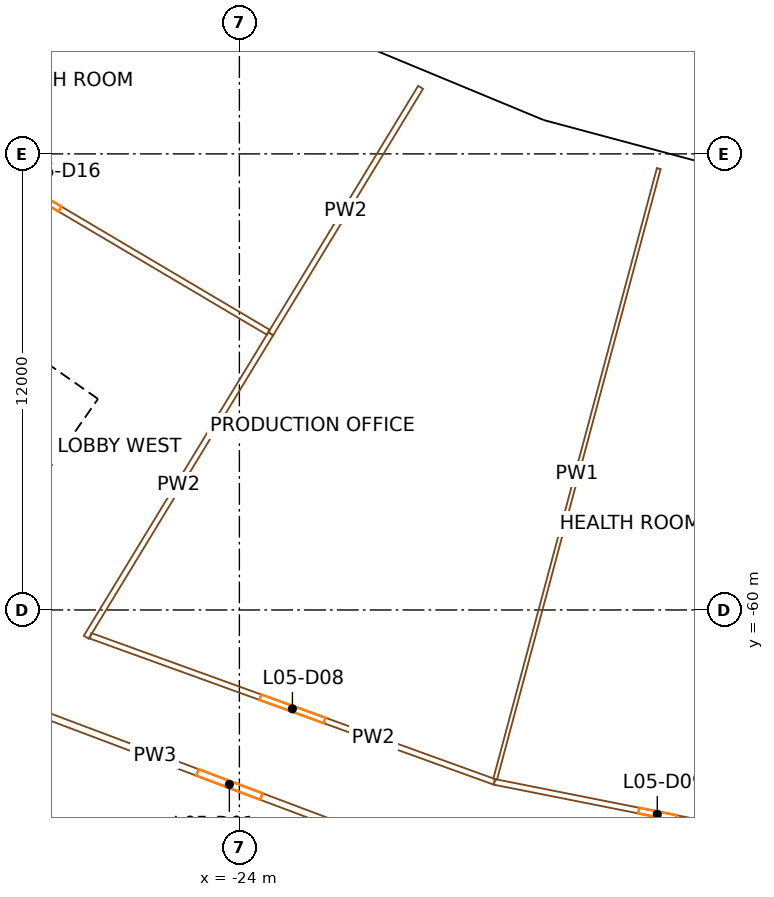
"""IFC4 building model, lengths in metres.
Left out: names, types, materials, properties, quantities, classifications, styles, units other than length and angle.
Written with IfcOpenShell. Run it as: python <this file> out.ifc"""

import sys

from ifc_helpers import new_model, si_unit, direction, frame, frame_2d, origin, origin_2d, place, context, subcontext, project, spatial, rectangle, extrude, element, fill, save


model = new_model("IFC4")
c1 = context("Model", 3, precision=1e-05, world=origin(), true_north=direction((0.0, 1.0)))
c2 = subcontext(c1, "Body", "Model", "MODEL_VIEW")
j1 = project(units=[si_unit("LENGTHUNIT", "METRE"), si_unit("PLANEANGLEUNIT", "RADIAN")], contexts=[c1])
p1 = place(None, origin())
s1 = spatial("IfcSite", under=j1, at=p1, CompositionType="ELEMENT")
p2 = place(p1, origin())
s2 = spatial("IfcBuilding", under=s1, at=p2, CompositionType="ELEMENT")
p3 = place(p2, frame((0.0, 0.0, 36.0)))
s3 = spatial("IfcBuildingStorey", under=s2, at=p3, CompositionType="ELEMENT", Elevation=36.0)
p4 = place(p3, frame((-22.446, -45.516, 0.0), z_axis=(0.0, 0.0, 1.0), x_axis=(0.896872741533, -0.442288690219, 0.0)))
e1 = element("IfcColumn", 1, at=p4, inside=s3, PredefinedType="COLUMN", context=c2, shape_type="SweptSolid", body=[
    extrude(rectangle(XDim=1.1, YDim=1.3, at=origin_2d()), origin(), (0.0, 0.0, 1.0), 4.5),
])
p5 = place(p3, frame((-25.763, -52.243, 0.0), z_axis=(0.0, 0.0, 1.0), x_axis=(0.896872741533, -0.442288690219, 0.0)))
e2 = element("IfcColumn", 2, at=p5, inside=s3, PredefinedType="COLUMN", context=c2, shape_type="SweptSolid", body=[
    extrude(rectangle(XDim=1.4, YDim=1.8, at=origin_2d()), origin(), (0.0, 0.0, 1.0), 4.5),
])
p6 = place(p3, frame((-16.313, -48.057, 0.0), z_axis=(0.0, 0.0, 1.0), x_axis=(0.946930129495, -0.321439465303, 0.0)))
e3 = element("IfcColumn", 3, at=p6, inside=s3, PredefinedType="COLUMN", context=c2, shape_type="SweptSolid", body=[
    extrude(rectangle(XDim=1.1, YDim=1.3, at=origin_2d()), origin(), (0.0, 0.0, 1.0), 4.5),
])
for number, where, z_axis, x_axis in (
    (4, (-18.724, -55.159, 0.0), (0.0, 0.0, 1.0), (0.947, -0.321, 0.0)),
    (5, (-11.364, -57.131, 0.0), (0.0, 0.0, 1.0), (0.981, -0.195, 0.0)),
):
    element("IfcColumn", number, at=place(p3, frame(where, z_axis=z_axis, x_axis=x_axis)), inside=s3, PredefinedType="COLUMN", context=c2, shape_type="SweptSolid", body=[
        extrude(rectangle(XDim=1.4, YDim=1.8, at=origin_2d()), origin(), (0.0, 0.0, 1.0), 4.5),
    ])
p7 = place(p3, frame((-36.717, -66.337, 0.0), z_axis=(0.0, 0.0, 1.0), x_axis=(0.573577477574, 0.819151315216, 0.0)))
e6 = element("IfcWall", 6, at=p7, inside=s3, PredefinedType="SHEAR", context=c2, shape_type="SweptSolid", body=[
    extrude(rectangle(XDim=14.8, YDim=0.9, at=frame_2d((7.4, 0.0))), origin(), (0.0, 0.0, 1.0), 4.2),
])
p8 = place(p7, frame((6.2, 0.0, 0.0)))
e7 = element("IfcOpeningElement", 7, at=p8, cuts=e6, PredefinedType="OPENING", context=c2, shape_type="SweptSolid", body=[
    extrude(rectangle(XDim=2.4, YDim=2.1, at=frame_2d((1.2, 1.05))), frame((0.0, 0.46, 0.0), z_axis=(0.0, -1.0, 0.0), x_axis=(1.0, 0.0, 0.0)), (0.0, 0.0, 1.0), 0.92),
])
p9 = place(p3, frame((-28.854, -54.324, 0.0), z_axis=(0.0, 0.0, 1.0), x_axis=(-0.819145767589, 0.573585400304, 0.0)))
e8 = element("IfcWall", 8, at=p9, inside=s3, PredefinedType="SHEAR", context=c2, shape_type="SweptSolid", body=[
    extrude(rectangle(XDim=15.045, YDim=0.9, at=frame_2d((7.523, 0.0))), origin(), (0.0, 0.0, 1.0), 4.2),
])
p10 = place(p9, frame((1.05, 0.0, 0.0)))
e9 = element("IfcOpeningElement", 9, at=p10, cuts=e8, PredefinedType="OPENING", context=c2, shape_type="SweptSolid", body=[
    extrude(rectangle(XDim=0.9, YDim=2.1, at=frame_2d((0.45, 1.05))), frame((0.0, 0.46, 0.0), z_axis=(0.0, -1.0, 0.0), x_axis=(1.0, 0.0, 0.0)), (0.0, 0.0, 1.0), 0.92),
])
p11 = place(p9, frame((3.775, 0.0, 0.0)))
e10 = element("IfcOpeningElement", 10, at=p11, cuts=e8, PredefinedType="OPENING", context=c2, shape_type="SweptSolid", body=[
    extrude(rectangle(XDim=1.0, YDim=2.1, at=frame_2d((0.5, 1.05))), frame((0.0, 0.46, 0.0), z_axis=(0.0, -1.0, 0.0), x_axis=(1.0, 0.0, 0.0)), (0.0, 0.0, 1.0), 0.92),
])
p12 = place(p9, frame((6.275, 0.0, 0.0)))
e11 = element("IfcOpeningElement", 11, at=p12, cuts=e8, PredefinedType="OPENING", context=c2, shape_type="SweptSolid", body=[
    extrude(rectangle(XDim=1.0, YDim=2.1, at=frame_2d((0.5, 1.05))), frame((0.0, 0.46, 0.0), z_axis=(0.0, -1.0, 0.0), x_axis=(1.0, 0.0, 0.0)), (0.0, 0.0, 1.0), 0.92),
])
p13 = place(p9, frame((13.495, 0.0, 0.0)))
e12 = element("IfcOpeningElement", 12, at=p13, cuts=e8, PredefinedType="OPENING", context=c2, shape_type="SweptSolid", body=[
    extrude(rectangle(XDim=1.1, YDim=2.1, at=frame_2d((0.55, 1.05))), frame((0.0, 0.46, 0.0), z_axis=(0.0, -1.0, 0.0), x_axis=(1.0, 0.0, 0.0)), (0.0, 0.0, 1.0), 0.92),
])
p14 = place(p3, frame((-16.036, -47.335, 0.0), z_axis=(0.0, 0.0, 1.0), x_axis=(-0.923877459804, 0.382688436284, 0.0)))
e13 = element("IfcWall", 13, at=p14, inside=s3, PredefinedType="SOLIDWALL", context=c2, shape_type="SweptSolid", body=[
    extrude(rectangle(XDim=6.597, YDim=0.45, at=frame_2d((3.299, 0.0))), origin(), (0.0, 0.0, 1.0), 3.2),
])
p15 = place(p14, frame((3.749, 0.0, 0.9)))
e14 = element("IfcOpeningElement", 14, at=p15, cuts=e13, PredefinedType="OPENING", context=c2, shape_type="SweptSolid", body=[
    extrude(rectangle(XDim=1.2, YDim=2.15, at=frame_2d((0.6, 1.075))), frame((0.0, 0.235, 0.0), z_axis=(0.0, -1.0, 0.0), x_axis=(1.0, 0.0, 0.0)), (0.0, 0.0, 1.0), 0.47),
])
p16 = place(p14, frame((1.648, 0.0, 0.9)))
e15 = element("IfcOpeningElement", 15, at=p16, cuts=e13, PredefinedType="OPENING", context=c2, shape_type="SweptSolid", body=[
    extrude(rectangle(XDim=1.2, YDim=2.15, at=frame_2d((0.6, 1.075))), frame((0.0, 0.235, 0.0), z_axis=(0.0, -1.0, 0.0), x_axis=(1.0, 0.0, 0.0)), (0.0, 0.0, 1.0), 0.47),
])
p17 = place(p3, frame((-9.807, -49.0, 0.0), z_axis=(0.0, 0.0, 1.0), x_axis=(-0.965926830738, 0.25881529642, 0.0)))
e16 = element("IfcWall", 16, at=p17, inside=s3, PredefinedType="SOLIDWALL", context=c2, shape_type="SweptSolid", body=[
    extrude(rectangle(XDim=6.419, YDim=0.45, at=frame_2d((3.209, 0.0))), origin(), (0.0, 0.0, 1.0), 3.2),
])
p18 = place(p17, frame((3.66, 0.0, 0.9)))
e17 = element("IfcOpeningElement", 17, at=p18, cuts=e16, PredefinedType="OPENING", context=c2, shape_type="SweptSolid", body=[
    extrude(rectangle(XDim=1.2, YDim=2.15, at=frame_2d((0.6, 1.075))), frame((0.0, 0.235, 0.0), z_axis=(0.0, -1.0, 0.0), x_axis=(1.0, 0.0, 0.0)), (0.0, 0.0, 1.0), 0.47),
])
p19 = place(p17, frame((1.56, 0.0, 0.9)))
e18 = element("IfcOpeningElement", 18, at=p19, cuts=e16, PredefinedType="OPENING", context=c2, shape_type="SweptSolid", body=[
    extrude(rectangle(XDim=1.2, YDim=2.15, at=frame_2d((0.6, 1.075))), frame((0.0, 0.235, 0.0), z_axis=(0.0, -1.0, 0.0), x_axis=(1.0, 0.0, 0.0)), (0.0, 0.0, 1.0), 0.47),
])
p20 = place(p3, frame((-35.065, -45.697, 0.0), z_axis=(0.0, 0.0, 1.0), x_axis=(0.860638818745, -0.509215891022, 0.0)))
e19 = element("IfcWall", 19, at=p20, inside=s3, PredefinedType="PARTITIONING", context=c2, shape_type="SweptSolid", body=[
    extrude(rectangle(XDim=13.741, YDim=0.15, at=frame_2d((6.871, 0.0))), origin(), (0.0, 0.0, 1.0), 3.1),
])
p21 = place(p20, frame((6.37, 0.0, 0.0)))
e20 = element("IfcOpeningElement", 20, at=p21, cuts=e19, PredefinedType="OPENING", context=c2, shape_type="SweptSolid", body=[
    extrude(rectangle(XDim=1.0, YDim=2.1, at=frame_2d((0.5, 1.05))), frame((0.0, 0.085, 0.0), z_axis=(0.0, -1.0, 0.0), x_axis=(1.0, 0.0, 0.0)), (0.0, 0.0, 1.0), 0.17),
])
p22 = place(p3, frame((-19.366, -66.435, 0.0), z_axis=(0.0, 0.0, 1.0), x_axis=(-0.935901890315, 0.352260772305, 0.0)))
e21 = element("IfcWall", 21, at=p22, inside=s3, PredefinedType="PARTITIONING", context=c2, shape_type="SweptSolid", body=[
    extrude(rectangle(XDim=10.466, YDim=0.18, at=frame_2d((5.233, 0.0))), origin(), (0.0, 0.0, 1.0), 3.1),
])
p23 = place(p22, frame((4.333, 0.0, 0.0)))
e22 = element("IfcOpeningElement", 22, at=p23, cuts=e21, PredefinedType="OPENING", context=c2, shape_type="SweptSolid", body=[
    extrude(rectangle(XDim=1.8, YDim=2.4, at=frame_2d((0.9, 1.2))), frame((0.0, 0.1, 0.0), z_axis=(0.0, -1.0, 0.0), x_axis=(1.0, 0.0, 0.0)), (0.0, 0.0, 1.0), 0.2),
])
p24 = place(p3, frame((-27.92, -60.678, 0.0), z_axis=(0.0, 0.0, 1.0), x_axis=(0.940369024046, -0.340155991589, 0.0)))
e23 = element("IfcWall", 23, at=p24, inside=s3, PredefinedType="PARTITIONING", context=c2, shape_type="SweptSolid", body=[
    extrude(rectangle(XDim=11.305, YDim=0.15, at=frame_2d((5.652, 0.0))), origin(), (0.0, 0.0, 1.0), 3.1),
])
p25 = place(p24, frame((4.752, 0.0, 0.0)))
e24 = element("IfcOpeningElement", 24, at=p25, cuts=e23, PredefinedType="OPENING", context=c2, shape_type="SweptSolid", body=[
    extrude(rectangle(XDim=1.8, YDim=2.1, at=frame_2d((0.9, 1.05))), frame((0.0, 0.085, 0.0), z_axis=(0.0, -1.0, 0.0), x_axis=(1.0, 0.0, 0.0)), (0.0, 0.0, 1.0), 0.17),
])
p26 = place(p3, frame((-23.174, -52.732, 0.0), z_axis=(0.0, 0.0, 1.0), x_axis=(-0.519577254173, -0.854423476355, 0.0)))
e25 = element("IfcWall", 25, at=p26, inside=s3, PredefinedType="PARTITIONING", context=c2, shape_type="SweptSolid", body=[
    extrude(rectangle(XDim=9.345, YDim=0.15, at=frame_2d((4.672, 0.0))), origin(), (0.0, 0.0, 1.0), 3.1),
])
p27 = place(p3, frame((-19.231, -46.249, 0.0), z_axis=(0.0, 0.0, 1.0), x_axis=(-0.519582509181, -0.854420280748, 0.0)))
e26 = element("IfcWall", 26, at=p27, inside=s3, PredefinedType="PARTITIONING", context=c2, shape_type="SweptSolid", body=[
    extrude(rectangle(XDim=7.588, YDim=0.15, at=frame_2d((3.794, 0.0))), origin(), (0.0, 0.0, 1.0), 3.1),
])
p28 = place(p3, frame((-17.289, -64.524, 0.0), z_axis=(0.0, 0.0, 1.0), x_axis=(0.980786466832, -0.195084357342, 0.0)))
e27 = element("IfcWall", 27, at=p28, inside=s3, PredefinedType="PARTITIONING", context=c2, shape_type="SweptSolid", body=[
    extrude(rectangle(XDim=8.738, YDim=0.15, at=frame_2d((4.369, 0.0))), origin(), (0.0, 0.0, 1.0), 3.1),
])
p29 = place(p28, frame((3.869, 0.0, 0.0)))
e28 = element("IfcOpeningElement", 28, at=p29, cuts=e27, PredefinedType="OPENING", context=c2, shape_type="SweptSolid", body=[
    extrude(rectangle(XDim=1.0, YDim=2.1, at=frame_2d((0.5, 1.05))), frame((0.0, 0.085, 0.0), z_axis=(0.0, -1.0, 0.0), x_axis=(1.0, 0.0, 0.0)), (0.0, 0.0, 1.0), 0.17),
])
p30 = place(p3, frame((-12.965, -48.386, 0.0), z_axis=(0.0, 0.0, 1.0), x_axis=(-0.258824622624, -0.965924331779, 0.0)))
e29 = element("IfcWall", 29, at=p30, inside=s3, PredefinedType="PARTITIONING", context=c2, shape_type="SweptSolid", body=[
    extrude(rectangle(XDim=16.632, YDim=0.1, at=frame_2d((8.316, 0.0))), origin(), (0.0, 0.0, 1.0), 3.1),
])
p31 = place(p15, origin())
e30 = element("IfcWindow", 30, at=p31, inside=s3, PartitioningType="SINGLE_PANEL", PredefinedType="WINDOW", context=c2, shape_type="SweptSolid", body=[
    extrude(rectangle(XDim=1.2, YDim=2.15, at=frame_2d((0.6, 1.075))), frame((0.0, 0.03, 0.0), z_axis=(0.0, -1.0, 0.0), x_axis=(1.0, 0.0, 0.0)), (0.0, 0.0, 1.0), 0.06),
])
fill(e14, e30)
p32 = place(p16, origin())
e31 = element("IfcWindow", 31, at=p32, inside=s3, PartitioningType="SINGLE_PANEL", PredefinedType="WINDOW", context=c2, shape_type="SweptSolid", body=[
    extrude(rectangle(XDim=1.2, YDim=2.15, at=frame_2d((0.6, 1.075))), frame((0.0, 0.03, 0.0), z_axis=(0.0, -1.0, 0.0), x_axis=(1.0, 0.0, 0.0)), (0.0, 0.0, 1.0), 0.06),
])
fill(e15, e31)
p33 = place(p18, origin())
e32 = element("IfcWindow", 32, at=p33, inside=s3, PartitioningType="SINGLE_PANEL", PredefinedType="WINDOW", context=c2, shape_type="SweptSolid", body=[
    extrude(rectangle(XDim=1.2, YDim=2.15, at=frame_2d((0.6, 1.075))), frame((0.0, 0.03, 0.0), z_axis=(0.0, -1.0, 0.0), x_axis=(1.0, 0.0, 0.0)), (0.0, 0.0, 1.0), 0.06),
])
fill(e17, e32)
p34 = place(p19, origin())
e33 = element("IfcWindow", 33, at=p34, inside=s3, PartitioningType="SINGLE_PANEL", PredefinedType="WINDOW", context=c2, shape_type="SweptSolid", body=[
    extrude(rectangle(XDim=1.2, YDim=2.15, at=frame_2d((0.6, 1.075))), frame((0.0, 0.03, 0.0), z_axis=(0.0, -1.0, 0.0), x_axis=(1.0, 0.0, 0.0)), (0.0, 0.0, 1.0), 0.06),
])
fill(e18, e33)
p35 = place(p23, origin())
e34 = element("IfcDoor", 34, at=p35, inside=s3, OperationType="DOUBLE_DOOR_SINGLE_SWING", PredefinedType="DOOR", context=c2, shape_type="SweptSolid", body=[
    extrude(rectangle(XDim=1.8, YDim=2.4, at=frame_2d((0.9, 1.2))), frame((0.0, 0.025, 0.0), z_axis=(0.0, -1.0, 0.0), x_axis=(1.0, 0.0, 0.0)), (0.0, 0.0, 1.0), 0.05),
])
fill(e22, e34)
p36 = place(p25, origin())
e35 = element("IfcDoor", 35, at=p36, inside=s3, OperationType="DOUBLE_DOOR_SINGLE_SWING", PredefinedType="DOOR", context=c2, shape_type="SweptSolid", body=[
    extrude(rectangle(XDim=1.8, YDim=2.1, at=frame_2d((0.9, 1.05))), frame((0.0, 0.025, 0.0), z_axis=(0.0, -1.0, 0.0), x_axis=(1.0, 0.0, 0.0)), (0.0, 0.0, 1.0), 0.05),
])
fill(e24, e35)
p37 = place(p29, origin())
e36 = element("IfcDoor", 36, at=p37, inside=s3, OperationType="SINGLE_SWING_RIGHT", PredefinedType="DOOR", context=c2, shape_type="SweptSolid", body=[
    extrude(rectangle(XDim=1.0, YDim=2.1, at=frame_2d((0.5, 1.05))), frame((0.0, 0.025, 0.0), z_axis=(0.0, -1.0, 0.0), x_axis=(1.0, 0.0, 0.0)), (0.0, 0.0, 1.0), 0.05),
])
fill(e28, e36)
p38 = place(p21, origin())
e37 = element("IfcDoor", 37, at=p38, inside=s3, OperationType="SINGLE_SWING_RIGHT", PredefinedType="DOOR", context=c2, shape_type="SweptSolid", body=[
    extrude(rectangle(XDim=1.0, YDim=2.1, at=frame_2d((0.5, 1.05))), frame((0.0, 0.025, 0.0), z_axis=(0.0, -1.0, 0.0), x_axis=(1.0, 0.0, 0.0)), (0.0, 0.0, 1.0), 0.05),
])
fill(e20, e37)
save(model, sys.argv[1])
